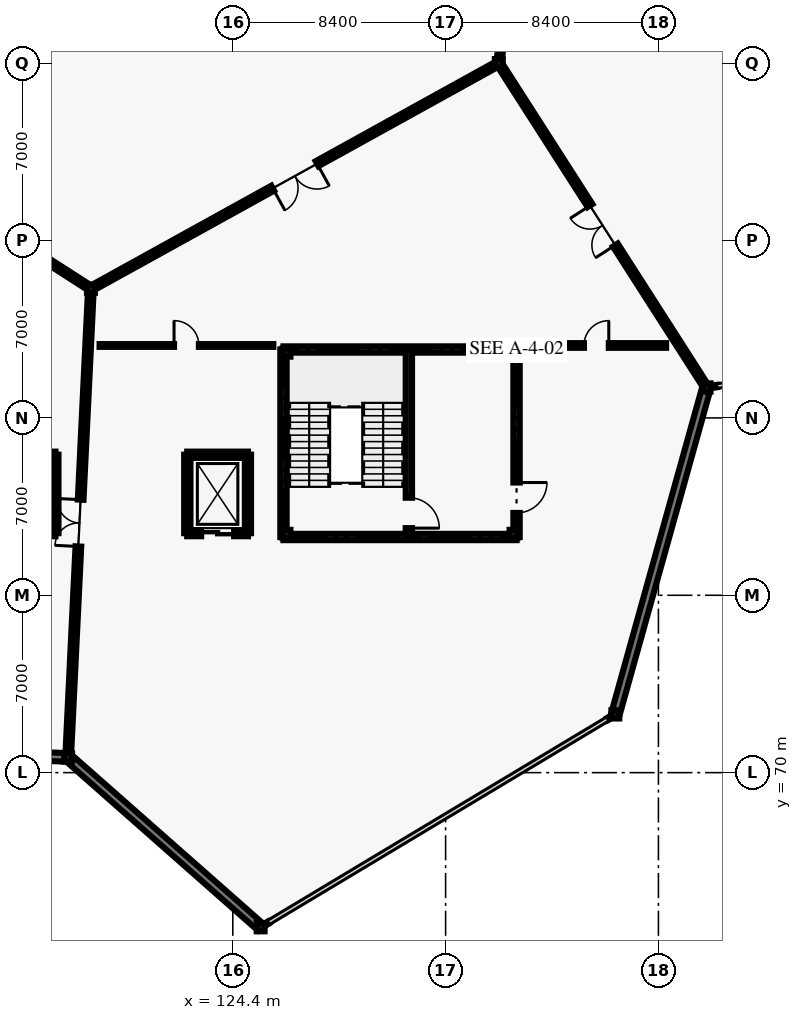
"""IFC4 building model, lengths in metres.
Left out: names, types, materials, properties, quantities, classifications, styles, units other than length and angle.
Written with IfcOpenShell. Run it as: python <this file> out.ifc"""

import sys

from ifc_helpers import new_model, si_unit, direction, frame, frame_2d, origin, origin_2d, place, context, subcontext, project, spatial, rectangle, i_section, extrude, element, fill, save


model = new_model("IFC4")
c1 = context("Model", 3, precision=1e-05, world=origin(), true_north=direction((0.0, 1.0)))
c2 = subcontext(c1, "Body", "Model", "MODEL_VIEW")
j1 = project(units=[si_unit("LENGTHUNIT", "METRE"), si_unit("PLANEANGLEUNIT", "RADIAN")], contexts=[c1])
p1 = place(None, origin())
s1 = spatial("IfcSite", under=j1, at=p1, CompositionType="ELEMENT")
p2 = place(p1, origin())
s2 = spatial("IfcBuilding", under=s1, at=p2, CompositionType="ELEMENT")
p3 = place(p2, frame((0.0, 0.0, 10.2)))
s3 = spatial("IfcBuildingStorey", under=s2, at=p3, CompositionType="ELEMENT", Elevation=10.2)
for number, where, z_axis, x_axis in (
    (1, (117.9, 70.6, 0.0), (0.0, 0.0, 1.0), (1.0, 0.0, 0.0)),
    (2, (118.8, 89.1, 0.0), (0.0, 0.0, 1.0), (1.0, 0.0, 0.0)),
    (3, (125.5, 63.9, 0.0), (0.0, 0.0, 1.0), (1.0, 0.0, 0.0)),
    (4, (134.9, 98.0, 0.0), (0.0, 0.0, 1.0), (1.0, 0.0, 0.0)),
    (5, (139.5, 72.3, 0.0), (0.0, 0.0, 1.0), (1.0, 0.0, 0.0)),
    (6, (143.1, 85.2, 0.0), (0.0, 0.0, 1.0), (1.0, 0.0, 0.0)),
    (7, (126.52, 79.42, 0.0), (0.0, 0.0, 1.0), (1.0, 0.0, 0.0)),
    (8, (135.48, 79.42, 0.0), (0.0, 0.0, 1.0), (1.0, 0.0, 0.0)),
    (9, (135.48, 86.58, 0.0), (0.0, 0.0, 1.0), (1.0, 0.0, 0.0)),
    (10, (126.52, 86.58, 0.0), (0.0, 0.0, 1.0), (1.0, 0.0, 0.0)),
):
    element("IfcColumn", number, at=place(p3, frame(where, z_axis=z_axis, x_axis=x_axis)), inside=s3, PredefinedType="COLUMN", context=c2, shape_type="SweptSolid", body=[
        extrude(i_section(OverallWidth=0.311, OverallDepth=0.327, WebThickness=0.016, FlangeThickness=0.025, FilletRadius=0.017, at=origin_2d()), origin(), (0.0, 0.0, 1.0), 4.8),
    ])
p4 = place(p3, frame((117.84, 70.602, 0.0), z_axis=(0.0, 0.0, 1.0), x_axis=(-0.999284381651, 0.037824920194, 0.0)))
e11 = element("IfcWall", 11, at=p4, inside=s3, PredefinedType="SOLIDWALL", context=c2, shape_type="SweptSolid", body=[
    extrude(rectangle(XDim=18.453, YDim=0.34, at=frame_2d((9.227, 0.0))), origin(), (0.0, 0.0, 1.0), 3.62),
])
p5 = place(p3, frame((125.5, 63.9, 0.0), z_axis=(0.0, 0.0, 1.0), x_axis=(-0.750131359252, 0.661288850554, 0.0)))
e12 = element("IfcWall", 12, at=p5, inside=s3, PredefinedType="SOLIDWALL", context=c2, shape_type="SweptSolid", body=[
    extrude(rectangle(XDim=10.072, YDim=0.34, at=frame_2d((5.036, 0.0))), origin(), (0.0, 0.0, 1.0), 3.62),
])
for number, where, z_axis, x_axis in (
    (13, (139.464, 72.278, 0.0), (0.0, 0.0, 1.0), (-0.858, -0.513, 0.0)),
    (14, (125.8, 64.08, 0.0), (0.0, 0.0, 1.0), (-0.858, -0.513, 0.0)),
):
    element("IfcWall", number, at=place(p3, frame(where, z_axis=z_axis, x_axis=x_axis)), inside=s3, PredefinedType="SOLIDWALL", context=c2, shape_type="SweptSolid", body=[
        extrude(rectangle(XDim=0.308, YDim=0.095, at=frame_2d((0.154, 0.0))), origin(), (0.0, 0.0, 1.0), 3.62),
    ])
p6 = place(p3, frame((143.084, 85.142, 0.0), z_axis=(0.0, 0.0, 1.0), x_axis=(-0.268810029922, -0.963193214165, 0.0)))
e15 = element("IfcWall", 15, at=p6, inside=s3, PredefinedType="SOLIDWALL", context=c2, shape_type="SweptSolid", body=[
    extrude(rectangle(XDim=13.333, YDim=0.34, at=frame_2d((6.667, 0.0))), origin(), (0.0, 0.0, 1.0), 3.62),
])
p7 = place(p3, frame((143.506, 85.257, 0.0), z_axis=(0.0, 0.0, 1.0), x_axis=(-0.990232667812, -0.139424759628, 0.0)))
e16 = element("IfcWall", 16, at=p7, inside=s3, PredefinedType="SOLIDWALL", context=c2, shape_type="SweptSolid", body=[
    extrude(rectangle(XDim=0.308, YDim=0.095, at=frame_2d((0.154, 0.0))), origin(), (0.0, 0.0, 1.0), 3.62),
])
p8 = place(p3, frame((117.9, 70.6, 0.0), z_axis=(0.0, 0.0, 1.0), x_axis=(0.048599072515, 0.998818366947, 0.0)))
e17 = element("IfcWall", 17, at=p8, inside=s3, PredefinedType="SOLIDWALL", context=c2, shape_type="SweptSolid", body=[
    extrude(rectangle(XDim=18.522, YDim=0.225, at=frame_2d((9.261, 0.0))), origin(), (0.0, 0.0, 1.0), 4.02),
])
p9 = place(p8, frame((8.336, 0.0, 0.0)))
e18 = element("IfcOpeningElement", 18, at=p9, cuts=e17, PredefinedType="OPENING", context=c2, shape_type="SweptSolid", body=[
    extrude(rectangle(XDim=1.85, YDim=2.4, at=frame_2d((0.925, 1.2))), frame((0.0, 0.123, 0.0), z_axis=(0.0, -1.0, 0.0), x_axis=(1.0, 0.0, 0.0)), (0.0, 0.0, 1.0), 0.245),
])
p10 = place(p3, frame((118.8, 89.1, 0.0), z_axis=(0.0, 0.0, 1.0), x_axis=(-0.841183241423, 0.540750177392, 0.0)))
e19 = element("IfcWall", 19, at=p10, inside=s3, PredefinedType="SOLIDWALL", context=c2, shape_type="SweptSolid", body=[
    extrude(rectangle(XDim=18.308, YDim=0.225, at=frame_2d((9.154, 0.0))), origin(), (0.0, 0.0, 1.0), 4.02),
])
p11 = place(p10, frame((8.054, 0.0, 0.0)))
e20 = element("IfcOpeningElement", 20, at=p11, cuts=e19, PredefinedType="OPENING", context=c2, shape_type="SweptSolid", body=[
    extrude(rectangle(XDim=2.2, YDim=2.6, at=frame_2d((1.1, 1.3))), frame((0.0, 0.123, 0.0), z_axis=(0.0, -1.0, 0.0), x_axis=(1.0, 0.0, 0.0)), (0.0, 0.0, 1.0), 0.245),
])
p12 = place(p3, frame((134.9, 98.0, 0.0), z_axis=(0.0, 0.0, 1.0), x_axis=(-0.875181353329, -0.483794996652, 0.0)))
e21 = element("IfcWall", 21, at=p12, inside=s3, PredefinedType="SOLIDWALL", context=c2, shape_type="SweptSolid", body=[
    extrude(rectangle(XDim=18.396, YDim=0.225, at=frame_2d((9.198, 0.0))), origin(), (0.0, 0.0, 1.0), 4.02),
])
p13 = place(p12, frame((8.198, 0.0, 0.0)))
e22 = element("IfcOpeningElement", 22, at=p13, cuts=e21, PredefinedType="OPENING", context=c2, shape_type="SweptSolid", body=[
    extrude(rectangle(XDim=2.0, YDim=2.5, at=frame_2d((1.0, 1.25))), frame((0.0, 0.123, 0.0), z_axis=(0.0, -1.0, 0.0), x_axis=(1.0, 0.0, 0.0)), (0.0, 0.0, 1.0), 0.245),
])
p14 = place(p3, frame((143.1, 85.2, 0.0), z_axis=(0.0, 0.0, 1.0), x_axis=(-0.539434641352, 0.842027474439, 0.0)))
e23 = element("IfcWall", 23, at=p14, inside=s3, PredefinedType="SOLIDWALL", context=c2, shape_type="SweptSolid", body=[
    extrude(rectangle(XDim=15.201, YDim=0.225, at=frame_2d((7.601, 0.0))), origin(), (0.0, 0.0, 1.0), 4.02),
])
p15 = place(p14, frame((6.676, 0.0, 0.0)))
e24 = element("IfcOpeningElement", 24, at=p15, cuts=e23, PredefinedType="OPENING", context=c2, shape_type="SweptSolid", body=[
    extrude(rectangle(XDim=1.85, YDim=2.4, at=frame_2d((0.925, 1.2))), frame((0.0, 0.123, 0.0), z_axis=(0.0, -1.0, 0.0), x_axis=(1.0, 0.0, 0.0)), (0.0, 0.0, 1.0), 0.245),
])
p16 = place(p3, frame((134.9, 98.0, 0.0), z_axis=(0.0, 0.0, 1.0), x_axis=(0.127980011854, 0.991776747341, 0.0)))
e25 = element("IfcWall", 25, at=p16, inside=s3, PredefinedType="SOLIDWALL", context=c2, shape_type="SweptSolid", body=[
    extrude(rectangle(XDim=6.251, YDim=0.205, at=frame_2d((3.126, 0.0))), origin(), (0.0, 0.0, 1.0), 3.32),
])
p17 = place(p16, frame((2.526, 0.0, 0.0)))
e26 = element("IfcOpeningElement", 26, at=p17, cuts=e25, PredefinedType="OPENING", context=c2, shape_type="SweptSolid", body=[
    extrude(rectangle(XDim=1.2, YDim=2.2, at=frame_2d((0.6, 1.1))), frame((0.0, 0.113, 0.0), z_axis=(0.0, -1.0, 0.0), x_axis=(1.0, 0.0, 0.0)), (0.0, 0.0, 1.0), 0.225),
])
p18 = place(p3, frame((119.142, 86.859, 0.0), z_axis=(0.0, 0.0, 1.0), x_axis=(1.0, 0.0, 0.0)))
e27 = element("IfcWall", 27, at=p18, inside=s3, PredefinedType="PARTITIONING", context=c2, shape_type="SweptSolid", body=[
    extrude(rectangle(XDim=6.858, YDim=0.11, at=frame_2d((3.429, 0.0))), origin(), (0.0, 0.0, 1.0), 3.32),
])
p19 = place(p18, frame((2.939, 0.0, 0.0)))
e28 = element("IfcOpeningElement", 28, at=p19, cuts=e27, PredefinedType="OPENING", context=c2, shape_type="SweptSolid", body=[
    extrude(rectangle(XDim=0.98, YDim=2.15, at=frame_2d((0.49, 1.075))), frame((0.0, 0.065, 0.0), z_axis=(0.0, -1.0, 0.0), x_axis=(1.0, 0.0, 0.0)), (0.0, 0.0, 1.0), 0.13),
])
p20 = place(p3, frame((136.0, 86.859, 0.0), z_axis=(0.0, 0.0, 1.0), x_axis=(1.0, 0.0, 0.0)))
e29 = element("IfcWall", 29, at=p20, inside=s3, PredefinedType="PARTITIONING", context=c2, shape_type="SweptSolid", body=[
    extrude(rectangle(XDim=5.503, YDim=0.185, at=frame_2d((2.751, 0.0))), origin(), (0.0, 0.0, 1.0), 3.32),
])
p21 = place(p20, frame((2.261, 0.0, 0.0)))
e30 = element("IfcOpeningElement", 30, at=p21, cuts=e29, PredefinedType="OPENING", context=c2, shape_type="SweptSolid", body=[
    extrude(rectangle(XDim=0.98, YDim=2.15, at=frame_2d((0.49, 1.075))), frame((0.0, 0.103, 0.0), z_axis=(0.0, -1.0, 0.0), x_axis=(1.0, 0.0, 0.0)), (0.0, 0.0, 1.0), 0.205),
])
p22 = place(p3, frame((126.4, 79.3, 0.0), z_axis=(0.0, 0.0, 1.0), x_axis=(0.0, 1.0, 0.0)))
e31 = element("IfcWall", 31, at=p22, inside=s3, PredefinedType="SHEAR", context=c2, shape_type="SweptSolid", body=[
    extrude(rectangle(XDim=7.4, YDim=0.25, at=frame_2d((3.7, 0.0))), origin(), (0.0, 0.0, 1.0), 4.56),
])
for number, where, z_axis, x_axis in (
    (32, (126.4, 86.7, 0.0), (0.0, 0.0, 1.0), (1.0, 0.0, 0.0)),
    (33, (135.6, 79.3, 0.0), (0.0, 0.0, 1.0), (-1.0, 0.0, 0.0)),
):
    element("IfcWall", number, at=place(p3, frame(where, z_axis=z_axis, x_axis=x_axis)), inside=s3, PredefinedType="SHEAR", context=c2, shape_type="SweptSolid", body=[
        extrude(rectangle(XDim=9.2, YDim=0.25, at=frame_2d((4.6, 0.0))), origin(), (0.0, 0.0, 1.0), 4.56),
    ])
p23 = place(p3, frame((135.6, 86.7, 0.0), z_axis=(0.0, 0.0, 1.0), x_axis=(0.0, -1.0, 0.0)))
e34 = element("IfcWall", 34, at=p23, inside=s3, PredefinedType="SHEAR", context=c2, shape_type="SweptSolid", body=[
    extrude(rectangle(XDim=7.4, YDim=0.25, at=frame_2d((3.7, 0.0))), origin(), (0.0, 0.0, 1.0), 4.56),
])
p24 = place(p23, frame((5.25, 0.0, 0.0)))
e35 = element("IfcOpeningElement", 35, at=p24, cuts=e34, PredefinedType="OPENING", context=c2, shape_type="SweptSolid", body=[
    extrude(rectangle(XDim=1.2, YDim=2.2, at=frame_2d((0.6, 1.1))), frame((0.0, 0.135, 0.0), z_axis=(0.0, -1.0, 0.0), x_axis=(1.0, 0.0, 0.0)), (0.0, 0.0, 1.0), 0.27),
])
p25 = place(p3, frame((131.35, 86.7, 0.0), z_axis=(0.0, 0.0, 1.0), x_axis=(0.0, -1.0, 0.0)))
e36 = element("IfcWall", 36, at=p25, inside=s3, PredefinedType="SHEAR", context=c2, shape_type="SweptSolid", body=[
    extrude(rectangle(XDim=7.4, YDim=0.25, at=frame_2d((3.7, 0.0))), origin(), (0.0, 0.0, 1.0), 4.56),
])
p26 = place(p25, frame((5.85, 0.0, 0.0)))
e37 = element("IfcOpeningElement", 37, at=p26, cuts=e36, PredefinedType="OPENING", context=c2, shape_type="SweptSolid", body=[
    extrude(rectangle(XDim=1.2, YDim=2.2, at=frame_2d((0.6, 1.1))), frame((0.0, 0.135, 0.0), z_axis=(0.0, -1.0, 0.0), x_axis=(1.0, 0.0, 0.0)), (0.0, 0.0, 1.0), 0.27),
])
p27 = place(p3, frame((115.0, 82.55, 0.0), z_axis=(0.0, 0.0, 1.0), x_axis=(1.0, 0.0, 0.0)))
e38 = element("IfcWall", 38, at=p27, inside=s3, PredefinedType="SHEAR", context=c2, shape_type="SweptSolid", body=[
    extrude(rectangle(XDim=2.4, YDim=0.24, at=frame_2d((1.2, 0.0))), origin(), (0.0, 0.0, 1.0), 4.56),
])
p28 = place(p3, frame((117.4, 82.55, 0.0), z_axis=(0.0, 0.0, 1.0), x_axis=(0.0, -1.0, 0.0)))
e39 = element("IfcWall", 39, at=p28, inside=s3, PredefinedType="SHEAR", context=c2, shape_type="SweptSolid", body=[
    extrude(rectangle(XDim=3.1, YDim=0.24, at=frame_2d((1.55, 0.0))), origin(), (0.0, 0.0, 1.0), 4.56),
])
p29 = place(p3, frame((117.4, 79.45, 0.0), z_axis=(0.0, 0.0, 1.0), x_axis=(-1.0, 0.0, 0.0)))
e40 = element("IfcWall", 40, at=p29, inside=s3, PredefinedType="SHEAR", context=c2, shape_type="SweptSolid", body=[
    extrude(rectangle(XDim=2.4, YDim=0.24, at=frame_2d((1.2, 0.0))), origin(), (0.0, 0.0, 1.0), 4.56),
])
p30 = place(p29, frame((0.55, 0.0, 0.0)))
e41 = element("IfcOpeningElement", 41, at=p30, cuts=e40, PredefinedType="OPENING", context=c2, shape_type="SweptSolid", body=[
    extrude(rectangle(XDim=1.3, YDim=2.25, at=frame_2d((0.65, 1.125))), frame((0.0, 0.13, 0.0), z_axis=(0.0, -1.0, 0.0), x_axis=(1.0, 0.0, 0.0)), (0.0, 0.0, 1.0), 0.26),
])
p31 = place(p3, frame((122.6, 82.55, 0.0), z_axis=(0.0, 0.0, 1.0), x_axis=(1.0, 0.0, 0.0)))
e42 = element("IfcWall", 42, at=p31, inside=s3, PredefinedType="SHEAR", context=c2, shape_type="SweptSolid", body=[
    extrude(rectangle(XDim=2.4, YDim=0.24, at=frame_2d((1.2, 0.0))), origin(), (0.0, 0.0, 1.0), 4.56),
])
for number, where, z_axis, x_axis in (
    (43, (125.0, 82.55, 0.0), (0.0, 0.0, 1.0), (0.0, -1.0, 0.0)),
    (44, (122.6, 79.45, 0.0), (0.0, 0.0, 1.0), (0.0, 1.0, 0.0)),
):
    element("IfcWall", number, at=place(p3, frame(where, z_axis=z_axis, x_axis=x_axis)), inside=s3, PredefinedType="SHEAR", context=c2, shape_type="SweptSolid", body=[
        extrude(rectangle(XDim=3.1, YDim=0.24, at=frame_2d((1.55, 0.0))), origin(), (0.0, 0.0, 1.0), 4.56),
    ])
p32 = place(p3, frame((125.0, 79.45, 0.0), z_axis=(0.0, 0.0, 1.0), x_axis=(-1.0, 0.0, 0.0)))
e45 = element("IfcWall", 45, at=p32, inside=s3, PredefinedType="SHEAR", context=c2, shape_type="SweptSolid", body=[
    extrude(rectangle(XDim=2.4, YDim=0.24, at=frame_2d((1.2, 0.0))), origin(), (0.0, 0.0, 1.0), 4.56),
])
p33 = place(p32, frame((0.55, 0.0, 0.0)))
e46 = element("IfcOpeningElement", 46, at=p33, cuts=e45, PredefinedType="OPENING", context=c2, shape_type="SweptSolid", body=[
    extrude(rectangle(XDim=1.3, YDim=2.25, at=frame_2d((0.65, 1.125))), frame((0.0, 0.13, 0.0), z_axis=(0.0, -1.0, 0.0), x_axis=(1.0, 0.0, 0.0)), (0.0, 0.0, 1.0), 0.26),
])
p34 = place(p9, origin())
e47 = element("IfcDoor", 47, at=p34, inside=s3, OperationType="DOUBLE_DOOR_SINGLE_SWING", PredefinedType="DOOR", context=c2, shape_type="SweptSolid", body=[
    extrude(rectangle(XDim=1.85, YDim=2.4, at=frame_2d((0.925, 1.2))), frame((0.0, 0.025, 0.0), z_axis=(0.0, -1.0, 0.0), x_axis=(1.0, 0.0, 0.0)), (0.0, 0.0, 1.0), 0.05),
])
fill(e18, e47)
p35 = place(p13, origin())
e48 = element("IfcDoor", 48, at=p35, inside=s3, OperationType="DOUBLE_DOOR_SINGLE_SWING", PredefinedType="DOOR", context=c2, shape_type="SweptSolid", body=[
    extrude(rectangle(XDim=2.0, YDim=2.5, at=frame_2d((1.0, 1.25))), frame((0.0, 0.025, 0.0), z_axis=(0.0, -1.0, 0.0), x_axis=(1.0, 0.0, 0.0)), (0.0, 0.0, 1.0), 0.05),
])
fill(e22, e48)
p36 = place(p15, origin())
e49 = element("IfcDoor", 49, at=p36, inside=s3, OperationType="DOUBLE_DOOR_SINGLE_SWING", PredefinedType="DOOR", context=c2, shape_type="SweptSolid", body=[
    extrude(rectangle(XDim=1.85, YDim=2.4, at=frame_2d((0.925, 1.2))), frame((0.0, 0.025, 0.0), z_axis=(0.0, -1.0, 0.0), x_axis=(1.0, 0.0, 0.0)), (0.0, 0.0, 1.0), 0.05),
])
fill(e24, e49)
p37 = place(p19, origin())
e50 = element("IfcDoor", 50, at=p37, inside=s3, OperationType="SINGLE_SWING_LEFT", PredefinedType="DOOR", context=c2, shape_type="SweptSolid", body=[
    extrude(rectangle(XDim=0.98, YDim=2.15, at=frame_2d((0.49, 1.075))), frame((0.0, 0.025, 0.0), z_axis=(0.0, -1.0, 0.0), x_axis=(1.0, 0.0, 0.0)), (0.0, 0.0, 1.0), 0.05),
])
fill(e28, e50)
p38 = place(p21, origin())
e51 = element("IfcDoor", 51, at=p38, inside=s3, OperationType="SINGLE_SWING_RIGHT", PredefinedType="DOOR", context=c2, shape_type="SweptSolid", body=[
    extrude(rectangle(XDim=0.98, YDim=2.15, at=frame_2d((0.49, 1.075))), frame((0.0, 0.025, 0.0), z_axis=(0.0, -1.0, 0.0), x_axis=(1.0, 0.0, 0.0)), (0.0, 0.0, 1.0), 0.05),
])
fill(e30, e51)
p39 = place(p24, origin())
e52 = element("IfcDoor", 52, at=p39, inside=s3, OperationType="SINGLE_SWING_LEFT", PredefinedType="DOOR", context=c2, shape_type="SweptSolid", body=[
    extrude(rectangle(XDim=1.2, YDim=2.2, at=frame_2d((0.6, 1.1))), frame((0.0, 0.025, 0.0), z_axis=(0.0, -1.0, 0.0), x_axis=(1.0, 0.0, 0.0)), (0.0, 0.0, 1.0), 0.05),
])
fill(e35, e52)
p40 = place(p26, origin())
e53 = element("IfcDoor", 53, at=p40, inside=s3, OperationType="SINGLE_SWING_RIGHT", PredefinedType="DOOR", context=c2, shape_type="SweptSolid", body=[
    extrude(rectangle(XDim=1.2, YDim=2.2, at=frame_2d((0.6, 1.1))), frame((0.0, 0.025, 0.0), z_axis=(0.0, -1.0, 0.0), x_axis=(1.0, 0.0, 0.0)), (0.0, 0.0, 1.0), 0.05),
])
fill(e37, e53)
p41 = place(p33, origin())
e54 = element("IfcDoor", 54, at=p41, inside=s3, OperationType="SLIDING_TO_LEFT", PredefinedType="DOOR", context=c2, shape_type="SweptSolid", body=[
    extrude(rectangle(XDim=1.3, YDim=2.25, at=frame_2d((0.65, 1.125))), frame((0.0, 0.025, 0.0), z_axis=(0.0, -1.0, 0.0), x_axis=(1.0, 0.0, 0.0)), (0.0, 0.0, 1.0), 0.05),
])
fill(e46, e54)
save(model, sys.argv[1])
